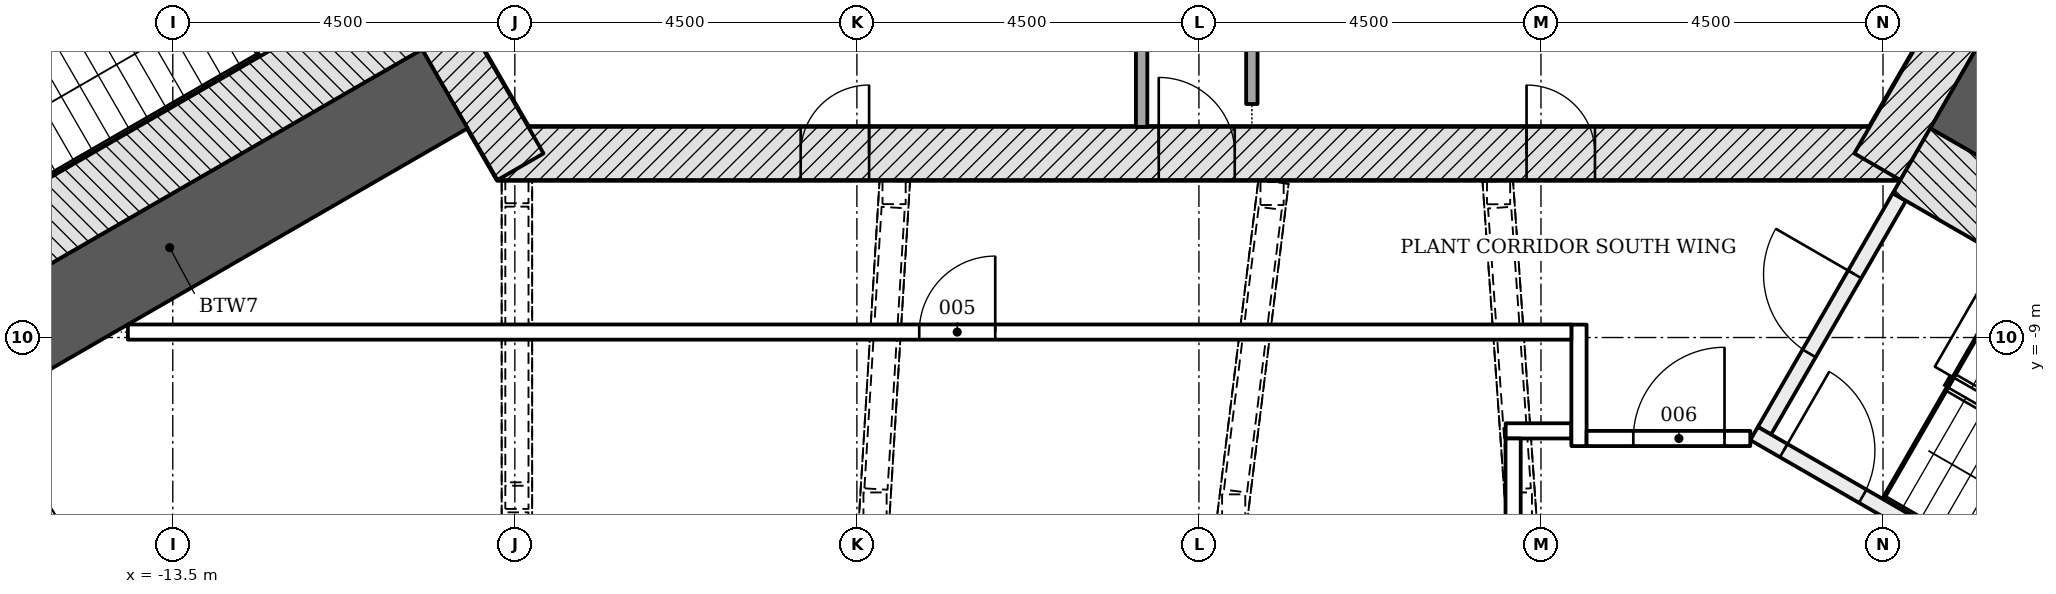
"""IFC4 building model, lengths in metres.
Left out: names, types, materials, properties, quantities, classifications, styles, units other than length and angle.
Written with IfcOpenShell. Run it as: python <this file> out.ifc"""

import sys

from ifc_helpers import new_model, si_unit, direction, frame, frame_2d, origin, place, context, subcontext, project, spatial, rectangle, extrude, element, fill, save


model = new_model("IFC4")
c1 = context("Model", 3, precision=1e-05, world=origin(), true_north=direction((0.0, 1.0)))
c2 = subcontext(c1, "Body", "Model", "MODEL_VIEW")
j1 = project(units=[si_unit("LENGTHUNIT", "METRE"), si_unit("PLANEANGLEUNIT", "RADIAN")], contexts=[c1])
p1 = place(None, origin())
s1 = spatial("IfcSite", under=j1, at=p1, CompositionType="ELEMENT")
p2 = place(p1, origin())
s2 = spatial("IfcBuilding", under=s1, at=p2, CompositionType="ELEMENT")
p3 = place(p2, frame((0.0, 0.0, 210.3)))
s3 = spatial("IfcBuildingStorey", under=s2, at=p3, CompositionType="ELEMENT", Elevation=210.3)
p4 = place(p3, frame((-9.229, -6.578, -0.3), z_axis=(0.0, 0.0, 1.0), x_axis=(1.0, 0.0, 0.0)))
e1 = element("IfcWall", 1, at=p4, inside=s3, PredefinedType="SHEAR", context=c2, shape_type="SweptSolid", body=[
    extrude(rectangle(XDim=18.458, YDim=0.7, at=frame_2d((9.229, 0.0))), origin(), (0.0, 0.0, 1.0), 4.6),
])
p5 = place(p4, frame((8.7, 0.0, 0.3)))
e2 = element("IfcOpeningElement", 2, at=p5, cuts=e1, PredefinedType="OPENING", context=c2, shape_type="SweptSolid", body=[
    extrude(rectangle(XDim=1.0, YDim=2.1, at=frame_2d((0.5, 1.05))), frame((0.0, 0.36, 0.0), z_axis=(0.0, -1.0, 0.0), x_axis=(1.0, 0.0, 0.0)), (0.0, 0.0, 1.0), 0.72),
])
p6 = place(p4, frame((3.99, 0.0, 0.3)))
e3 = element("IfcOpeningElement", 3, at=p6, cuts=e1, PredefinedType="OPENING", context=c2, shape_type="SweptSolid", body=[
    extrude(rectangle(XDim=0.9, YDim=2.1, at=frame_2d((0.45, 1.05))), frame((0.0, 0.36, 0.0), z_axis=(0.0, -1.0, 0.0), x_axis=(1.0, 0.0, 0.0)), (0.0, 0.0, 1.0), 0.72),
])
p7 = place(p4, frame((13.539, 0.0, 0.3)))
e4 = element("IfcOpeningElement", 4, at=p7, cuts=e1, PredefinedType="OPENING", context=c2, shape_type="SweptSolid", body=[
    extrude(rectangle(XDim=0.9, YDim=2.1, at=frame_2d((0.45, 1.05))), frame((0.0, 0.36, 0.0), z_axis=(0.0, -1.0, 0.0), x_axis=(1.0, 0.0, 0.0)), (0.0, 0.0, 1.0), 0.72),
])
for number, where, z_axis, x_axis in (
    (5, (8.926, -6.753, -0.3), (0.0, 0.0, 1.0), (0.5, 0.866, 0.0)),
    (6, (-10.311, -4.353, -0.3), (0.0, 0.0, 1.0), (0.5, -0.866, 0.0)),
):
    element("IfcWall", number, at=place(p3, frame(where, z_axis=z_axis, x_axis=x_axis)), inside=s3, PredefinedType="SHEAR", context=c2, shape_type="SweptSolid", body=[
        extrude(rectangle(XDim=2.771, YDim=0.7, at=frame_2d((1.386, 0.0))), origin(), (0.0, 0.0, 1.0), 4.6),
    ])
for number, where, z_axis, x_axis in (
    (7, (-9.922, -5.728, -0.3), (0.0, 0.0, 1.0), (-0.866, -0.5, 0.0)),
    (8, (9.922, -5.728, -0.3), (0.0, 0.0, 1.0), (0.866, -0.5, 0.0)),
):
    element("IfcWall", number, at=place(p3, frame(where, z_axis=z_axis, x_axis=x_axis)), inside=s3, PredefinedType="SHEAR", context=c2, shape_type="SweptSolid", body=[
        extrude(rectangle(XDim=8.359, YDim=1.2, at=frame_2d((4.179, 0.0))), origin(), (0.0, 0.0, 1.0), 4.6),
    ])
p8 = place(p3, frame((-0.754, 5.272, 0.0), z_axis=(0.0, 0.0, 1.0), x_axis=(0.0, -1.0, 0.0)))
e9 = element("IfcWall", 9, at=p8, inside=s3, PredefinedType="PARTITIONING", context=c2, shape_type="SweptSolid", body=[
    extrude(rectangle(XDim=11.5, YDim=0.15, at=frame_2d((5.75, 0.0))), origin(), (0.0, 0.0, 1.0), 4.3),
])
p9 = place(p8, frame((3.701, 0.0, 0.0)))
e10 = element("IfcOpeningElement", 10, at=p9, cuts=e9, PredefinedType="OPENING", context=c2, shape_type="SweptSolid", body=[
    extrude(rectangle(XDim=0.9, YDim=2.1, at=frame_2d((0.45, 1.05))), frame((0.0, 0.085, 0.0), z_axis=(0.0, -1.0, 0.0), x_axis=(1.0, 0.0, 0.0)), (0.0, 0.0, 1.0), 0.17),
])
p10 = place(p3, frame((0.696, -5.928, 0.0), z_axis=(0.0, 0.0, 1.0), x_axis=(0.0, 1.0, 0.0)))
e11 = element("IfcWall", 11, at=p10, inside=s3, PredefinedType="PARTITIONING", context=c2, shape_type="SweptSolid", body=[
    extrude(rectangle(XDim=11.549, YDim=0.15, at=frame_2d((5.774, 0.0))), origin(), (0.0, 0.0, 1.0), 4.3),
])
p11 = place(p10, frame((6.6, 0.0, 0.0)))
e12 = element("IfcOpeningElement", 12, at=p11, cuts=e11, PredefinedType="OPENING", context=c2, shape_type="SweptSolid", body=[
    extrude(rectangle(XDim=0.9, YDim=2.1, at=frame_2d((0.45, 1.05))), frame((0.0, 0.085, 0.0), z_axis=(0.0, -1.0, 0.0), x_axis=(1.0, 0.0, 0.0)), (0.0, 0.0, 1.0), 0.17),
])
p12 = place(p3, frame((-10.468, -4.782, -0.3), z_axis=(0.0, 0.0, 1.0), x_axis=(-0.866018442252, -0.500012057535, 0.0)))
e13 = element("IfcWall", 13, at=p12, inside=s3, PredefinedType="SHEAR", context=c2, shape_type="SweptSolid", body=[
    extrude(rectangle(XDim=7.2, YDim=0.986, at=frame_2d((3.6, 0.0))), origin(), (0.0, 0.0, 1.0), 4.6),
])
p13 = place(p3, frame((7.44, -10.226, -0.3), z_axis=(0.0, 0.0, 1.0), x_axis=(0.500022077904, 0.866012656725, 0.0)))
e14 = element("IfcWall", 14, at=p13, inside=s3, PredefinedType="SHEAR", context=c2, shape_type="SweptSolid", body=[
    extrude(rectangle(XDim=3.55, YDim=0.2, at=frame_2d((1.775, 0.0))), origin(), (0.0, 0.0, 1.0), 4.6),
])
p14 = place(p13, frame((1.175, 0.0, 0.3)))
e15 = element("IfcOpeningElement", 15, at=p14, cuts=e14, PredefinedType="OPENING", context=c2, shape_type="SweptSolid", body=[
    extrude(rectangle(XDim=1.2, YDim=2.1, at=frame_2d((0.6, 1.05))), frame((0.0, 0.11, 0.0), z_axis=(0.0, -1.0, 0.0), x_axis=(1.0, 0.0, 0.0)), (0.0, 0.0, 1.0), 0.22),
])
p15 = place(p3, frame((7.304, -10.262, -0.3), z_axis=(0.0, 0.0, 1.0), x_axis=(0.866026594901, -0.49999793692, 0.0)))
e16 = element("IfcWall", 16, at=p15, inside=s3, PredefinedType="SHEAR", context=c2, shape_type="SweptSolid", body=[
    extrude(rectangle(XDim=5.6, YDim=0.2, at=frame_2d((2.8, 0.0))), origin(), (0.0, 0.0, 1.0), 4.6),
])
p16 = place(p15, frame((0.45, 0.0, 0.3)))
e17 = element("IfcOpeningElement", 17, at=p16, cuts=e16, PredefinedType="OPENING", context=c2, shape_type="SweptSolid", body=[
    extrude(rectangle(XDim=1.2, YDim=2.1, at=frame_2d((0.6, 1.05))), frame((0.0, 0.11, 0.0), z_axis=(0.0, -1.0, 0.0), x_axis=(1.0, 0.0, 0.0)), (0.0, 0.0, 1.0), 0.22),
])
p17 = place(p3, frame((9.375, -6.675, -0.3), z_axis=(0.0, 0.0, 1.0), x_axis=(0.866026919366, -0.499997374926, 0.0)))
e18 = element("IfcWall", 18, at=p17, inside=s3, PredefinedType="SHEAR", context=c2, shape_type="SweptSolid", body=[
    extrude(rectangle(XDim=7.2, YDim=0.986, at=frame_2d((3.6, 0.0))), origin(), (0.0, 0.0, 1.0), 4.6),
])
p18 = place(p3, frame((4.036, -10.228, 0.0), z_axis=(0.0, 0.0, 1.0), x_axis=(1.0, 0.0, 0.0)))
e19 = element("IfcWall", 19, at=p18, inside=s3, PredefinedType="PARTITIONING", context=c2, shape_type="SweptSolid", body=[
    extrude(rectangle(XDim=0.864, YDim=0.2, at=frame_2d((0.432, 0.0))), origin(), (0.0, 0.0, 1.0), 4.3),
])
p19 = place(p3, frame((5.0, -10.428, 0.0), z_axis=(0.0, 0.0, 1.0), x_axis=(0.0, 1.0, 0.0)))
e20 = element("IfcWall", 20, at=p19, inside=s3, PredefinedType="PARTITIONING", context=c2, shape_type="SweptSolid", body=[
    extrude(rectangle(XDim=1.598, YDim=0.2, at=frame_2d((0.799, 0.0))), origin(), (0.0, 0.0, 1.0), 4.3),
])
p20 = place(p3, frame((5.1, -10.328, 0.0), z_axis=(0.0, 0.0, 1.0), x_axis=(1.0, 0.0, 0.0)))
e21 = element("IfcWall", 21, at=p20, inside=s3, PredefinedType="PARTITIONING", context=c2, shape_type="SweptSolid", body=[
    extrude(rectangle(XDim=2.154, YDim=0.2, at=frame_2d((1.077, 0.0))), origin(), (0.0, 0.0, 1.0), 4.3),
])
p21 = place(p20, frame((0.615, 0.0, 0.0)))
e22 = element("IfcOpeningElement", 22, at=p21, cuts=e21, PredefinedType="OPENING", context=c2, shape_type="SweptSolid", body=[
    extrude(rectangle(XDim=1.2, YDim=2.1, at=frame_2d((0.6, 1.05))), frame((0.0, 0.11, 0.0), z_axis=(0.0, -1.0, 0.0), x_axis=(1.0, 0.0, 0.0)), (0.0, 0.0, 1.0), 0.22),
])
p22 = place(p3, frame((-14.091, -8.928, 0.0), z_axis=(0.0, 0.0, 1.0), x_axis=(1.0, 0.0, 0.0)))
e23 = element("IfcWall", 23, at=p22, inside=s3, PredefinedType="PARTITIONING", context=c2, shape_type="SweptSolid", body=[
    extrude(rectangle(XDim=18.991, YDim=0.2, at=frame_2d((9.495, 0.0))), origin(), (0.0, 0.0, 1.0), 4.3),
])
p23 = place(p22, frame((10.411, 0.0, 0.0)))
e24 = element("IfcOpeningElement", 24, at=p23, cuts=e23, PredefinedType="OPENING", context=c2, shape_type="SweptSolid", body=[
    extrude(rectangle(XDim=1.0, YDim=2.1, at=frame_2d((0.5, 1.05))), frame((0.0, 0.11, 0.0), z_axis=(0.0, -1.0, 0.0), x_axis=(1.0, 0.0, 0.0)), (0.0, 0.0, 1.0), 0.22),
])
p24 = place(p3, frame((4.134, -10.328, 0.0), z_axis=(0.0, 0.0, 1.0), x_axis=(0.0, -1.0, 0.0)))
e25 = element("IfcWall", 25, at=p24, inside=s3, PredefinedType="PARTITIONING", context=c2, shape_type="SweptSolid", body=[
    extrude(rectangle(XDim=3.12, YDim=0.2, at=frame_2d((1.56, 0.0))), origin(), (0.0, 0.0, 1.0), 4.3),
])
p25 = place(p3, frame((5.455, 8.808, 0.0), z_axis=(0.0, 0.0, 1.0), x_axis=(0.49999276215, -0.866029582519, 0.0)))
e26 = element("IfcWall", 26, at=p25, inside=s3, PredefinedType="PARTITIONING", context=c2, shape_type="SweptSolid", body=[
    extrude(rectangle(XDim=19.337, YDim=0.2, at=frame_2d((9.668, 0.0))), origin(), (0.0, 0.0, 1.0), 3.752),
])
p26 = place(p25, frame((11.705, 0.0, 0.0)))
e27 = element("IfcOpeningElement", 27, at=p26, cuts=e26, PredefinedType="OPENING", context=c2, shape_type="SweptSolid", body=[
    extrude(rectangle(XDim=1.0, YDim=2.1, at=frame_2d((0.5, 1.05))), frame((0.0, 0.11, 0.0), z_axis=(0.0, -1.0, 0.0), x_axis=(1.0, 0.0, 0.0)), (0.0, 0.0, 1.0), 0.22),
])
p27 = place(p25, frame((1.351, 0.0, 0.0)))
e28 = element("IfcOpeningElement", 28, at=p27, cuts=e26, PredefinedType="OPENING", context=c2, shape_type="SweptSolid", body=[
    extrude(rectangle(XDim=1.0, YDim=2.1, at=frame_2d((0.5, 1.05))), frame((0.0, 0.11, 0.0), z_axis=(0.0, -1.0, 0.0), x_axis=(1.0, 0.0, 0.0)), (0.0, 0.0, 1.0), 0.22),
])
p28 = place(p5, origin())
e29 = element("IfcDoor", 29, at=p28, inside=s3, OperationType="SINGLE_SWING_LEFT", PredefinedType="DOOR", context=c2, shape_type="SweptSolid", body=[
    extrude(rectangle(XDim=1.0, YDim=2.1, at=frame_2d((0.5, 1.05))), frame((0.0, 0.075, 0.0), z_axis=(0.0, -1.0, 0.0), x_axis=(1.0, 0.0, 0.0)), (0.0, 0.0, 1.0), 0.15),
])
fill(e2, e29)
p29 = place(p6, origin())
e30 = element("IfcDoor", 30, at=p29, inside=s3, OperationType="SINGLE_SWING_RIGHT", PredefinedType="DOOR", context=c2, shape_type="SweptSolid", body=[
    extrude(rectangle(XDim=0.9, YDim=2.1, at=frame_2d((0.45, 1.05))), frame((0.0, 0.075, 0.0), z_axis=(0.0, -1.0, 0.0), x_axis=(1.0, 0.0, 0.0)), (0.0, 0.0, 1.0), 0.15),
])
fill(e3, e30)
p30 = place(p7, origin())
e31 = element("IfcDoor", 31, at=p30, inside=s3, OperationType="SINGLE_SWING_LEFT", PredefinedType="DOOR", context=c2, shape_type="SweptSolid", body=[
    extrude(rectangle(XDim=0.9, YDim=2.1, at=frame_2d((0.45, 1.05))), frame((0.0, 0.075, 0.0), z_axis=(0.0, -1.0, 0.0), x_axis=(1.0, 0.0, 0.0)), (0.0, 0.0, 1.0), 0.15),
])
fill(e4, e31)
p31 = place(p14, origin())
e32 = element("IfcDoor", 32, at=p31, inside=s3, OperationType="SINGLE_SWING_RIGHT", PredefinedType="DOOR", context=c2, shape_type="SweptSolid", body=[
    extrude(rectangle(XDim=1.2, YDim=2.1, at=frame_2d((0.6, 1.05))), frame((0.0, 0.025, 0.0), z_axis=(0.0, -1.0, 0.0), x_axis=(1.0, 0.0, 0.0)), (0.0, 0.0, 1.0), 0.05),
])
fill(e15, e32)
p32 = place(p16, origin())
e33 = element("IfcDoor", 33, at=p32, inside=s3, OperationType="SINGLE_SWING_LEFT", PredefinedType="DOOR", context=c2, shape_type="SweptSolid", body=[
    extrude(rectangle(XDim=1.2, YDim=2.1, at=frame_2d((0.6, 1.05))), frame((0.0, 0.025, 0.0), z_axis=(0.0, -1.0, 0.0), x_axis=(1.0, 0.0, 0.0)), (0.0, 0.0, 1.0), 0.05),
])
fill(e17, e33)
p33 = place(p23, origin())
e34 = element("IfcDoor", 34, at=p33, inside=s3, OperationType="SINGLE_SWING_RIGHT", PredefinedType="DOOR", context=c2, shape_type="SweptSolid", body=[
    extrude(rectangle(XDim=1.0, YDim=2.1, at=frame_2d((0.5, 1.05))), frame((0.0, 0.025, 0.0), z_axis=(0.0, -1.0, 0.0), x_axis=(1.0, 0.0, 0.0)), (0.0, 0.0, 1.0), 0.05),
])
fill(e24, e34)
p34 = place(p21, origin())
e35 = element("IfcDoor", 35, at=p34, inside=s3, OperationType="SINGLE_SWING_RIGHT", PredefinedType="DOOR", context=c2, shape_type="SweptSolid", body=[
    extrude(rectangle(XDim=1.2, YDim=2.1, at=frame_2d((0.6, 1.05))), frame((0.0, 0.025, 0.0), z_axis=(0.0, -1.0, 0.0), x_axis=(1.0, 0.0, 0.0)), (0.0, 0.0, 1.0), 0.05),
])
fill(e22, e35)
save(model, sys.argv[1])
